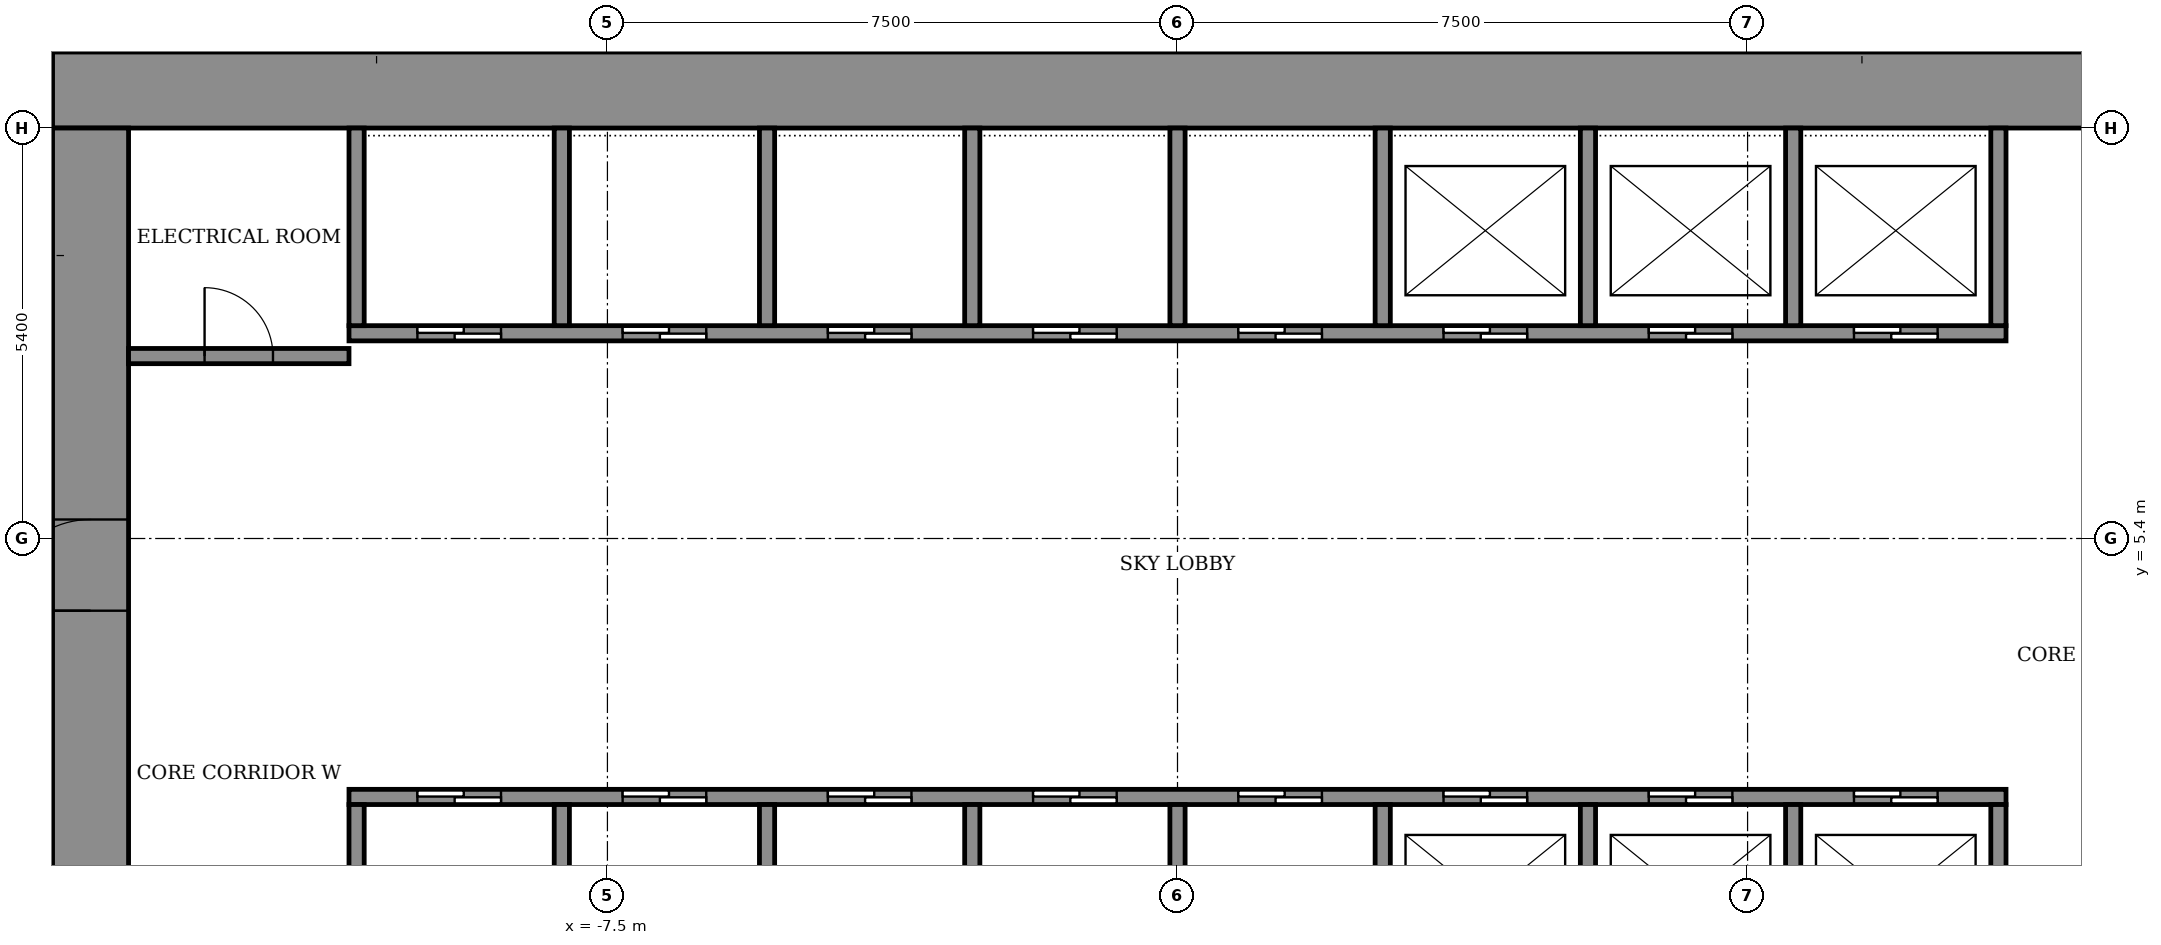
"""IFC4 building model, lengths in metres.
Left out: names, types, materials, properties, quantities, classifications, styles, units other than length and angle.
Written with IfcOpenShell. Run it as: python <this file> out.ifc"""

import sys

from ifc_helpers import new_model, si_unit, direction, frame, frame_2d, origin, place, context, subcontext, project, spatial, rectangle, extrude, element, fill, save


model = new_model("IFC4")
c1 = context("Model", 3, precision=1e-05, world=origin(), true_north=direction((0.0, 1.0)))
c2 = subcontext(c1, "Body", "Model", "MODEL_VIEW")
j1 = project(units=[si_unit("LENGTHUNIT", "METRE"), si_unit("PLANEANGLEUNIT", "RADIAN")], contexts=[c1])
p1 = place(None, origin())
s1 = spatial("IfcSite", under=j1, at=p1, CompositionType="ELEMENT")
p2 = place(p1, origin())
s2 = spatial("IfcBuilding", under=s1, at=p2, CompositionType="ELEMENT")
p3 = place(p2, frame((0.0, 0.0, 119.9)))
s3 = spatial("IfcBuildingStorey", under=s2, at=p3, CompositionType="ELEMENT", Elevation=119.9)
p4 = place(p3, frame((-14.8, 11.3, 0.0), z_axis=(0.0, 0.0, 1.0), x_axis=(1.0, 0.0, 0.0)))
e1 = element("IfcWall", 1, at=p4, inside=s3, PredefinedType="SHEAR", context=c2, shape_type="SweptSolid", body=[
    extrude(rectangle(XDim=29.6, YDim=1.0, at=frame_2d((14.8, 0.0))), origin(), (0.0, 0.0, 1.0), 5.6),
])
p5 = place(p3, frame((-14.3, -10.8, 0.0), z_axis=(0.0, 0.0, 1.0), x_axis=(0.0, 1.0, 0.0)))
e2 = element("IfcWall", 2, at=p5, inside=s3, PredefinedType="SHEAR", context=c2, shape_type="SweptSolid", body=[
    extrude(rectangle(XDim=21.6, YDim=1.0, at=frame_2d((10.8, 0.0))), origin(), (0.0, 0.0, 1.0), 5.6),
])
p6 = place(p5, frame((8.25, 0.0, 0.0)))
e3 = element("IfcOpeningElement", 3, at=p6, cuts=e2, PredefinedType="OPENING", context=c2, shape_type="SweptSolid", body=[
    extrude(rectangle(XDim=1.2, YDim=2.1, at=frame_2d((0.6, 1.05))), frame((0.0, 0.51, 0.0), z_axis=(0.0, -1.0, 0.0), x_axis=(1.0, 0.0, 0.0)), (0.0, 0.0, 1.0), 1.02),
])
p7 = place(p5, frame((15.25, 0.0, 0.0)))
e4 = element("IfcOpeningElement", 4, at=p7, cuts=e2, PredefinedType="OPENING", context=c2, shape_type="SweptSolid", body=[
    extrude(rectangle(XDim=1.2, YDim=2.1, at=frame_2d((0.6, 1.05))), frame((0.0, 0.51, 0.0), z_axis=(0.0, -1.0, 0.0), x_axis=(1.0, 0.0, 0.0)), (0.0, 0.0, 1.0), 1.02),
])
p8 = place(p5, frame((3.2, 0.0, 0.0)))
e5 = element("IfcOpeningElement", 5, at=p8, cuts=e2, PredefinedType="OPENING", context=c2, shape_type="SweptSolid", body=[
    extrude(rectangle(XDim=1.2, YDim=2.1, at=frame_2d((0.6, 1.05))), frame((0.0, 0.51, 0.0), z_axis=(0.0, -1.0, 0.0), x_axis=(1.0, 0.0, 0.0)), (0.0, 0.0, 1.0), 1.02),
])
p9 = place(p3, frame((-10.9, 2.0, 0.0), z_axis=(0.0, 0.0, 1.0), x_axis=(1.0, 0.0, 0.0)))
e6 = element("IfcWall", 6, at=p9, inside=s3, PredefinedType="SHEAR", context=c2, shape_type="SweptSolid", body=[
    extrude(rectangle(XDim=21.8, YDim=0.2, at=frame_2d((10.9, 0.0))), origin(), (0.0, 0.0, 1.0), 5.05),
])
p10 = place(p9, frame((0.9, 0.0, 0.0)))
e7 = element("IfcOpeningElement", 7, at=p10, cuts=e6, PredefinedType="OPENING", context=c2, shape_type="SweptSolid", body=[
    extrude(rectangle(XDim=1.1, YDim=2.1, at=frame_2d((0.55, 1.05))), frame((0.0, 0.11, 0.0), z_axis=(0.0, -1.0, 0.0), x_axis=(1.0, 0.0, 0.0)), (0.0, 0.0, 1.0), 0.22),
])
p11 = place(p9, frame((3.6, 0.0, 0.0)))
e8 = element("IfcOpeningElement", 8, at=p11, cuts=e6, PredefinedType="OPENING", context=c2, shape_type="SweptSolid", body=[
    extrude(rectangle(XDim=1.1, YDim=2.1, at=frame_2d((0.55, 1.05))), frame((0.0, 0.11, 0.0), z_axis=(0.0, -1.0, 0.0), x_axis=(1.0, 0.0, 0.0)), (0.0, 0.0, 1.0), 0.22),
])
p12 = place(p9, frame((6.3, 0.0, 0.0)))
e9 = element("IfcOpeningElement", 9, at=p12, cuts=e6, PredefinedType="OPENING", context=c2, shape_type="SweptSolid", body=[
    extrude(rectangle(XDim=1.1, YDim=2.1, at=frame_2d((0.55, 1.05))), frame((0.0, 0.11, 0.0), z_axis=(0.0, -1.0, 0.0), x_axis=(1.0, 0.0, 0.0)), (0.0, 0.0, 1.0), 0.22),
])
p13 = place(p9, frame((9.0, 0.0, 0.0)))
e10 = element("IfcOpeningElement", 10, at=p13, cuts=e6, PredefinedType="OPENING", context=c2, shape_type="SweptSolid", body=[
    extrude(rectangle(XDim=1.1, YDim=2.1, at=frame_2d((0.55, 1.05))), frame((0.0, 0.11, 0.0), z_axis=(0.0, -1.0, 0.0), x_axis=(1.0, 0.0, 0.0)), (0.0, 0.0, 1.0), 0.22),
])
p14 = place(p9, frame((11.7, 0.0, 0.0)))
e11 = element("IfcOpeningElement", 11, at=p14, cuts=e6, PredefinedType="OPENING", context=c2, shape_type="SweptSolid", body=[
    extrude(rectangle(XDim=1.1, YDim=2.1, at=frame_2d((0.55, 1.05))), frame((0.0, 0.11, 0.0), z_axis=(0.0, -1.0, 0.0), x_axis=(1.0, 0.0, 0.0)), (0.0, 0.0, 1.0), 0.22),
])
p15 = place(p9, frame((14.4, 0.0, 0.0)))
e12 = element("IfcOpeningElement", 12, at=p15, cuts=e6, PredefinedType="OPENING", context=c2, shape_type="SweptSolid", body=[
    extrude(rectangle(XDim=1.1, YDim=2.1, at=frame_2d((0.55, 1.05))), frame((0.0, 0.11, 0.0), z_axis=(0.0, -1.0, 0.0), x_axis=(1.0, 0.0, 0.0)), (0.0, 0.0, 1.0), 0.22),
])
p16 = place(p9, frame((17.1, 0.0, 0.0)))
e13 = element("IfcOpeningElement", 13, at=p16, cuts=e6, PredefinedType="OPENING", context=c2, shape_type="SweptSolid", body=[
    extrude(rectangle(XDim=1.1, YDim=2.1, at=frame_2d((0.55, 1.05))), frame((0.0, 0.11, 0.0), z_axis=(0.0, -1.0, 0.0), x_axis=(1.0, 0.0, 0.0)), (0.0, 0.0, 1.0), 0.22),
])
p17 = place(p9, frame((19.8, 0.0, 0.0)))
e14 = element("IfcOpeningElement", 14, at=p17, cuts=e6, PredefinedType="OPENING", context=c2, shape_type="SweptSolid", body=[
    extrude(rectangle(XDim=1.1, YDim=2.1, at=frame_2d((0.55, 1.05))), frame((0.0, 0.11, 0.0), z_axis=(0.0, -1.0, 0.0), x_axis=(1.0, 0.0, 0.0)), (0.0, 0.0, 1.0), 0.22),
])
p18 = place(p3, frame((-10.9, 8.1, 0.0), z_axis=(0.0, 0.0, 1.0), x_axis=(1.0, 0.0, 0.0)))
e15 = element("IfcWall", 15, at=p18, inside=s3, PredefinedType="SHEAR", context=c2, shape_type="SweptSolid", body=[
    extrude(rectangle(XDim=21.8, YDim=0.2, at=frame_2d((10.9, 0.0))), origin(), (0.0, 0.0, 1.0), 5.05),
])
p19 = place(p18, frame((0.9, 0.0, 0.0)))
e16 = element("IfcOpeningElement", 16, at=p19, cuts=e15, PredefinedType="OPENING", context=c2, shape_type="SweptSolid", body=[
    extrude(rectangle(XDim=1.1, YDim=2.1, at=frame_2d((0.55, 1.05))), frame((0.0, 0.11, 0.0), z_axis=(0.0, -1.0, 0.0), x_axis=(1.0, 0.0, 0.0)), (0.0, 0.0, 1.0), 0.22),
])
p20 = place(p18, frame((3.6, 0.0, 0.0)))
e17 = element("IfcOpeningElement", 17, at=p20, cuts=e15, PredefinedType="OPENING", context=c2, shape_type="SweptSolid", body=[
    extrude(rectangle(XDim=1.1, YDim=2.1, at=frame_2d((0.55, 1.05))), frame((0.0, 0.11, 0.0), z_axis=(0.0, -1.0, 0.0), x_axis=(1.0, 0.0, 0.0)), (0.0, 0.0, 1.0), 0.22),
])
p21 = place(p18, frame((6.3, 0.0, 0.0)))
e18 = element("IfcOpeningElement", 18, at=p21, cuts=e15, PredefinedType="OPENING", context=c2, shape_type="SweptSolid", body=[
    extrude(rectangle(XDim=1.1, YDim=2.1, at=frame_2d((0.55, 1.05))), frame((0.0, 0.11, 0.0), z_axis=(0.0, -1.0, 0.0), x_axis=(1.0, 0.0, 0.0)), (0.0, 0.0, 1.0), 0.22),
])
p22 = place(p18, frame((9.0, 0.0, 0.0)))
e19 = element("IfcOpeningElement", 19, at=p22, cuts=e15, PredefinedType="OPENING", context=c2, shape_type="SweptSolid", body=[
    extrude(rectangle(XDim=1.1, YDim=2.1, at=frame_2d((0.55, 1.05))), frame((0.0, 0.11, 0.0), z_axis=(0.0, -1.0, 0.0), x_axis=(1.0, 0.0, 0.0)), (0.0, 0.0, 1.0), 0.22),
])
p23 = place(p18, frame((11.7, 0.0, 0.0)))
e20 = element("IfcOpeningElement", 20, at=p23, cuts=e15, PredefinedType="OPENING", context=c2, shape_type="SweptSolid", body=[
    extrude(rectangle(XDim=1.1, YDim=2.1, at=frame_2d((0.55, 1.05))), frame((0.0, 0.11, 0.0), z_axis=(0.0, -1.0, 0.0), x_axis=(1.0, 0.0, 0.0)), (0.0, 0.0, 1.0), 0.22),
])
p24 = place(p18, frame((14.4, 0.0, 0.0)))
e21 = element("IfcOpeningElement", 21, at=p24, cuts=e15, PredefinedType="OPENING", context=c2, shape_type="SweptSolid", body=[
    extrude(rectangle(XDim=1.1, YDim=2.1, at=frame_2d((0.55, 1.05))), frame((0.0, 0.11, 0.0), z_axis=(0.0, -1.0, 0.0), x_axis=(1.0, 0.0, 0.0)), (0.0, 0.0, 1.0), 0.22),
])
p25 = place(p18, frame((17.1, 0.0, 0.0)))
e22 = element("IfcOpeningElement", 22, at=p25, cuts=e15, PredefinedType="OPENING", context=c2, shape_type="SweptSolid", body=[
    extrude(rectangle(XDim=1.1, YDim=2.1, at=frame_2d((0.55, 1.05))), frame((0.0, 0.11, 0.0), z_axis=(0.0, -1.0, 0.0), x_axis=(1.0, 0.0, 0.0)), (0.0, 0.0, 1.0), 0.22),
])
p26 = place(p18, frame((19.8, 0.0, 0.0)))
e23 = element("IfcOpeningElement", 23, at=p26, cuts=e15, PredefinedType="OPENING", context=c2, shape_type="SweptSolid", body=[
    extrude(rectangle(XDim=1.1, YDim=2.1, at=frame_2d((0.55, 1.05))), frame((0.0, 0.11, 0.0), z_axis=(0.0, -1.0, 0.0), x_axis=(1.0, 0.0, 0.0)), (0.0, 0.0, 1.0), 0.22),
])
for number, where, z_axis, x_axis in (
    (24, (-10.8, -0.6, 0.0), (0.0, 0.0, 1.0), (0.0, 1.0, 0.0)),
    (25, (-8.1, -0.6, 0.0), (0.0, 0.0, 1.0), (0.0, 1.0, 0.0)),
    (26, (-5.4, -0.6, 0.0), (0.0, 0.0, 1.0), (0.0, 1.0, 0.0)),
    (27, (-2.7, -0.6, 0.0), (0.0, 0.0, 1.0), (0.0, 1.0, 0.0)),
    (28, (0.0, -0.6, 0.0), (0.0, 0.0, 1.0), (0.0, 1.0, 0.0)),
    (29, (2.7, -0.6, 0.0), (0.0, 0.0, 1.0), (0.0, 1.0, 0.0)),
    (30, (5.4, -0.6, 0.0), (0.0, 0.0, 1.0), (0.0, 1.0, 0.0)),
    (31, (8.1, -0.6, 0.0), (0.0, 0.0, 1.0), (0.0, 1.0, 0.0)),
    (32, (10.8, -0.6, 0.0), (0.0, 0.0, 1.0), (0.0, 1.0, 0.0)),
):
    element("IfcWall", number, at=place(p3, frame(where, z_axis=z_axis, x_axis=x_axis)), inside=s3, PredefinedType="SHEAR", context=c2, shape_type="SweptSolid", body=[
        extrude(rectangle(XDim=2.5, YDim=0.2, at=frame_2d((1.25, 0.0))), origin(), (0.0, 0.0, 1.0), 5.05),
    ])
for number, where, z_axis, x_axis in (
    (33, (-10.8, 8.2, 0.0), (0.0, 0.0, 1.0), (0.0, 1.0, 0.0)),
    (34, (-8.1, 8.2, 0.0), (0.0, 0.0, 1.0), (0.0, 1.0, 0.0)),
    (35, (-5.4, 8.2, 0.0), (0.0, 0.0, 1.0), (0.0, 1.0, 0.0)),
    (36, (-2.7, 8.2, 0.0), (0.0, 0.0, 1.0), (0.0, 1.0, 0.0)),
    (37, (0.0, 8.2, 0.0), (0.0, 0.0, 1.0), (0.0, 1.0, 0.0)),
    (38, (2.7, 8.2, 0.0), (0.0, 0.0, 1.0), (0.0, 1.0, 0.0)),
    (39, (5.4, 8.2, 0.0), (0.0, 0.0, 1.0), (0.0, 1.0, 0.0)),
    (40, (8.1, 8.2, 0.0), (0.0, 0.0, 1.0), (0.0, 1.0, 0.0)),
    (41, (10.8, 8.2, 0.0), (0.0, 0.0, 1.0), (0.0, 1.0, 0.0)),
):
    element("IfcWall", number, at=place(p3, frame(where, z_axis=z_axis, x_axis=x_axis)), inside=s3, PredefinedType="SHEAR", context=c2, shape_type="SweptSolid", body=[
        extrude(rectangle(XDim=2.6, YDim=0.2, at=frame_2d((1.3, 0.0))), origin(), (0.0, 0.0, 1.0), 5.05),
    ])
p27 = place(p3, frame((-13.8, 7.8, 0.0), z_axis=(0.0, 0.0, 1.0), x_axis=(1.0, 0.0, 0.0)))
e42 = element("IfcWall", 42, at=p27, inside=s3, PredefinedType="STANDARD", context=c2, shape_type="SweptSolid", body=[
    extrude(rectangle(XDim=2.9, YDim=0.2, at=frame_2d((1.45, 0.0))), origin(), (0.0, 0.0, 1.0), 5.05),
])
p28 = place(p27, frame((1.0, 0.0, 0.0)))
e43 = element("IfcOpeningElement", 43, at=p28, cuts=e42, PredefinedType="OPENING", context=c2, shape_type="SweptSolid", body=[
    extrude(rectangle(XDim=0.9, YDim=2.1, at=frame_2d((0.45, 1.05))), frame((0.0, 0.11, 0.0), z_axis=(0.0, -1.0, 0.0), x_axis=(1.0, 0.0, 0.0)), (0.0, 0.0, 1.0), 0.22),
])
p29 = place(p7, origin())
e44 = element("IfcDoor", 44, at=p29, inside=s3, OperationType="DOUBLE_DOOR_SINGLE_SWING", PredefinedType="DOOR", context=c2, shape_type="SweptSolid", body=[
    extrude(rectangle(XDim=1.2, YDim=2.1, at=frame_2d((0.6, 1.05))), frame((0.0, 0.025, 0.0), z_axis=(0.0, -1.0, 0.0), x_axis=(1.0, 0.0, 0.0)), (0.0, 0.0, 1.0), 0.05),
])
fill(e4, e44)
p30 = place(p10, origin())
e45 = element("IfcDoor", 45, at=p30, inside=s3, OperationType="SLIDING_TO_LEFT", PredefinedType="DOOR", context=c2, shape_type="SweptSolid", body=[
    extrude(rectangle(XDim=1.1, YDim=2.1, at=frame_2d((0.55, 1.05))), frame((0.0, 0.025, 0.0), z_axis=(0.0, -1.0, 0.0), x_axis=(1.0, 0.0, 0.0)), (0.0, 0.0, 1.0), 0.05),
])
fill(e7, e45)
p31 = place(p11, origin())
e46 = element("IfcDoor", 46, at=p31, inside=s3, OperationType="SLIDING_TO_LEFT", PredefinedType="DOOR", context=c2, shape_type="SweptSolid", body=[
    extrude(rectangle(XDim=1.1, YDim=2.1, at=frame_2d((0.55, 1.05))), frame((0.0, 0.025, 0.0), z_axis=(0.0, -1.0, 0.0), x_axis=(1.0, 0.0, 0.0)), (0.0, 0.0, 1.0), 0.05),
])
fill(e8, e46)
p32 = place(p12, origin())
e47 = element("IfcDoor", 47, at=p32, inside=s3, OperationType="SLIDING_TO_LEFT", PredefinedType="DOOR", context=c2, shape_type="SweptSolid", body=[
    extrude(rectangle(XDim=1.1, YDim=2.1, at=frame_2d((0.55, 1.05))), frame((0.0, 0.025, 0.0), z_axis=(0.0, -1.0, 0.0), x_axis=(1.0, 0.0, 0.0)), (0.0, 0.0, 1.0), 0.05),
])
fill(e9, e47)
p33 = place(p13, origin())
e48 = element("IfcDoor", 48, at=p33, inside=s3, OperationType="SLIDING_TO_LEFT", PredefinedType="DOOR", context=c2, shape_type="SweptSolid", body=[
    extrude(rectangle(XDim=1.1, YDim=2.1, at=frame_2d((0.55, 1.05))), frame((0.0, 0.025, 0.0), z_axis=(0.0, -1.0, 0.0), x_axis=(1.0, 0.0, 0.0)), (0.0, 0.0, 1.0), 0.05),
])
fill(e10, e48)
p34 = place(p14, origin())
e49 = element("IfcDoor", 49, at=p34, inside=s3, OperationType="SLIDING_TO_LEFT", PredefinedType="DOOR", context=c2, shape_type="SweptSolid", body=[
    extrude(rectangle(XDim=1.1, YDim=2.1, at=frame_2d((0.55, 1.05))), frame((0.0, 0.025, 0.0), z_axis=(0.0, -1.0, 0.0), x_axis=(1.0, 0.0, 0.0)), (0.0, 0.0, 1.0), 0.05),
])
fill(e11, e49)
p35 = place(p15, origin())
e50 = element("IfcDoor", 50, at=p35, inside=s3, OperationType="SLIDING_TO_LEFT", PredefinedType="DOOR", context=c2, shape_type="SweptSolid", body=[
    extrude(rectangle(XDim=1.1, YDim=2.1, at=frame_2d((0.55, 1.05))), frame((0.0, 0.025, 0.0), z_axis=(0.0, -1.0, 0.0), x_axis=(1.0, 0.0, 0.0)), (0.0, 0.0, 1.0), 0.05),
])
fill(e12, e50)
p36 = place(p16, origin())
e51 = element("IfcDoor", 51, at=p36, inside=s3, OperationType="SLIDING_TO_LEFT", PredefinedType="DOOR", context=c2, shape_type="SweptSolid", body=[
    extrude(rectangle(XDim=1.1, YDim=2.1, at=frame_2d((0.55, 1.05))), frame((0.0, 0.025, 0.0), z_axis=(0.0, -1.0, 0.0), x_axis=(1.0, 0.0, 0.0)), (0.0, 0.0, 1.0), 0.05),
])
fill(e13, e51)
p37 = place(p17, origin())
e52 = element("IfcDoor", 52, at=p37, inside=s3, OperationType="SLIDING_TO_LEFT", PredefinedType="DOOR", context=c2, shape_type="SweptSolid", body=[
    extrude(rectangle(XDim=1.1, YDim=2.1, at=frame_2d((0.55, 1.05))), frame((0.0, 0.025, 0.0), z_axis=(0.0, -1.0, 0.0), x_axis=(1.0, 0.0, 0.0)), (0.0, 0.0, 1.0), 0.05),
])
fill(e14, e52)
p38 = place(p19, origin())
e53 = element("IfcDoor", 53, at=p38, inside=s3, OperationType="SLIDING_TO_LEFT", PredefinedType="DOOR", context=c2, shape_type="SweptSolid", body=[
    extrude(rectangle(XDim=1.1, YDim=2.1, at=frame_2d((0.55, 1.05))), frame((0.0, 0.025, 0.0), z_axis=(0.0, -1.0, 0.0), x_axis=(1.0, 0.0, 0.0)), (0.0, 0.0, 1.0), 0.05),
])
fill(e16, e53)
p39 = place(p20, origin())
e54 = element("IfcDoor", 54, at=p39, inside=s3, OperationType="SLIDING_TO_LEFT", PredefinedType="DOOR", context=c2, shape_type="SweptSolid", body=[
    extrude(rectangle(XDim=1.1, YDim=2.1, at=frame_2d((0.55, 1.05))), frame((0.0, 0.025, 0.0), z_axis=(0.0, -1.0, 0.0), x_axis=(1.0, 0.0, 0.0)), (0.0, 0.0, 1.0), 0.05),
])
fill(e17, e54)
p40 = place(p21, origin())
e55 = element("IfcDoor", 55, at=p40, inside=s3, OperationType="SLIDING_TO_LEFT", PredefinedType="DOOR", context=c2, shape_type="SweptSolid", body=[
    extrude(rectangle(XDim=1.1, YDim=2.1, at=frame_2d((0.55, 1.05))), frame((0.0, 0.025, 0.0), z_axis=(0.0, -1.0, 0.0), x_axis=(1.0, 0.0, 0.0)), (0.0, 0.0, 1.0), 0.05),
])
fill(e18, e55)
p41 = place(p22, origin())
e56 = element("IfcDoor", 56, at=p41, inside=s3, OperationType="SLIDING_TO_LEFT", PredefinedType="DOOR", context=c2, shape_type="SweptSolid", body=[
    extrude(rectangle(XDim=1.1, YDim=2.1, at=frame_2d((0.55, 1.05))), frame((0.0, 0.025, 0.0), z_axis=(0.0, -1.0, 0.0), x_axis=(1.0, 0.0, 0.0)), (0.0, 0.0, 1.0), 0.05),
])
fill(e19, e56)
p42 = place(p23, origin())
e57 = element("IfcDoor", 57, at=p42, inside=s3, OperationType="SLIDING_TO_LEFT", PredefinedType="DOOR", context=c2, shape_type="SweptSolid", body=[
    extrude(rectangle(XDim=1.1, YDim=2.1, at=frame_2d((0.55, 1.05))), frame((0.0, 0.025, 0.0), z_axis=(0.0, -1.0, 0.0), x_axis=(1.0, 0.0, 0.0)), (0.0, 0.0, 1.0), 0.05),
])
fill(e20, e57)
p43 = place(p24, origin())
e58 = element("IfcDoor", 58, at=p43, inside=s3, OperationType="SLIDING_TO_LEFT", PredefinedType="DOOR", context=c2, shape_type="SweptSolid", body=[
    extrude(rectangle(XDim=1.1, YDim=2.1, at=frame_2d((0.55, 1.05))), frame((0.0, 0.025, 0.0), z_axis=(0.0, -1.0, 0.0), x_axis=(1.0, 0.0, 0.0)), (0.0, 0.0, 1.0), 0.05),
])
fill(e21, e58)
p44 = place(p25, origin())
e59 = element("IfcDoor", 59, at=p44, inside=s3, OperationType="SLIDING_TO_LEFT", PredefinedType="DOOR", context=c2, shape_type="SweptSolid", body=[
    extrude(rectangle(XDim=1.1, YDim=2.1, at=frame_2d((0.55, 1.05))), frame((0.0, 0.025, 0.0), z_axis=(0.0, -1.0, 0.0), x_axis=(1.0, 0.0, 0.0)), (0.0, 0.0, 1.0), 0.05),
])
fill(e22, e59)
p45 = place(p26, origin())
e60 = element("IfcDoor", 60, at=p45, inside=s3, OperationType="SLIDING_TO_LEFT", PredefinedType="DOOR", context=c2, shape_type="SweptSolid", body=[
    extrude(rectangle(XDim=1.1, YDim=2.1, at=frame_2d((0.55, 1.05))), frame((0.0, 0.025, 0.0), z_axis=(0.0, -1.0, 0.0), x_axis=(1.0, 0.0, 0.0)), (0.0, 0.0, 1.0), 0.05),
])
fill(e23, e60)
p46 = place(p28, origin())
e61 = element("IfcDoor", 61, at=p46, inside=s3, OperationType="SINGLE_SWING_LEFT", PredefinedType="DOOR", context=c2, shape_type="SweptSolid", body=[
    extrude(rectangle(XDim=0.9, YDim=2.1, at=frame_2d((0.45, 1.05))), frame((0.0, 0.025, 0.0), z_axis=(0.0, -1.0, 0.0), x_axis=(1.0, 0.0, 0.0)), (0.0, 0.0, 1.0), 0.05),
])
fill(e43, e61)
save(model, sys.argv[1])
